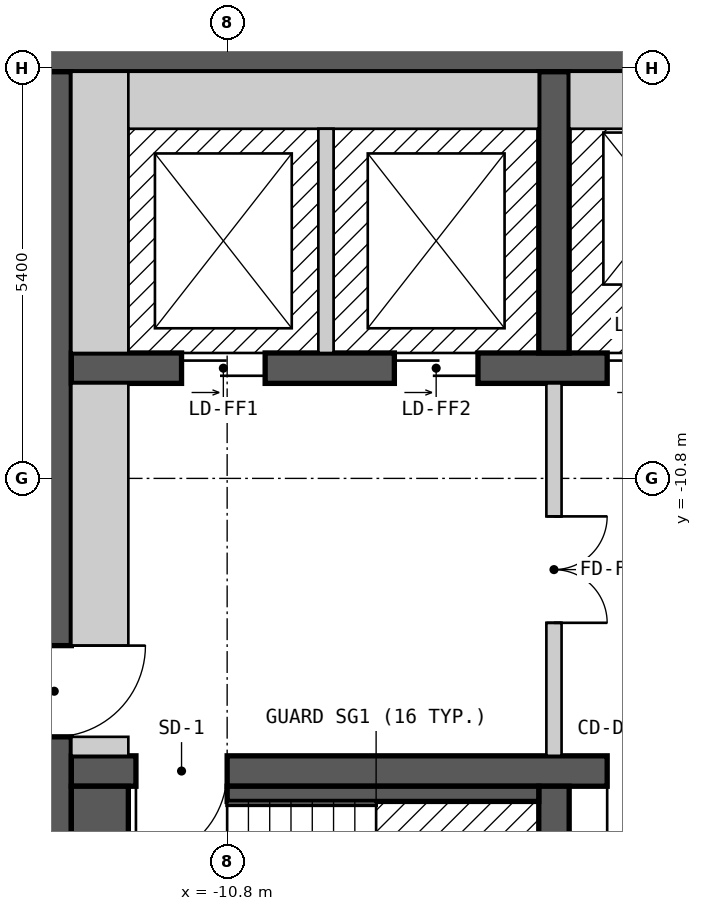
"""IFC4 building model, lengths in metres.
Left out: names, types, materials, properties, quantities, classifications, styles, units other than length and angle.
Written with IfcOpenShell. Run it as: python <this file> out.ifc"""

import sys

from ifc_helpers import new_model, si_unit, direction, frame, frame_2d, origin, place, context, subcontext, project, spatial, rectangle, extrude, element, fill, save


model = new_model("IFC4")
c1 = context("Model", 3, precision=1e-05, world=origin(), true_north=direction((0.0, 1.0)))
c2 = subcontext(c1, "Body", "Model", "MODEL_VIEW")
j1 = project(units=[si_unit("LENGTHUNIT", "METRE"), si_unit("PLANEANGLEUNIT", "RADIAN")], contexts=[c1])
p1 = place(None, origin())
s1 = spatial("IfcSite", under=j1, at=p1, CompositionType="ELEMENT")
p2 = place(p1, origin())
s2 = spatial("IfcBuilding", under=s1, at=p2, CompositionType="ELEMENT")
p3 = place(p2, frame((0.0, 0.0, 226.8)))
s3 = spatial("IfcBuildingStorey", under=s2, at=p3, CompositionType="ELEMENT", Elevation=226.8)
p4 = place(p3, frame((-13.3, -5.225, 0.0), z_axis=(0.0, 0.0, 1.0), x_axis=(1.0, 0.0, 0.0)))
e1 = element("IfcWall", 1, at=p4, inside=s3, PredefinedType="SHEAR", context=c2, shape_type="SweptSolid", body=[
    extrude(rectangle(XDim=26.6, YDim=0.45, at=frame_2d((13.3, 0.0))), origin(), (0.0, 0.0, 1.0), 2.7),
])
p5 = place(p4, frame((23.65, 0.0, 0.0)))
e2 = element("IfcOpeningElement", 2, at=p5, cuts=e1, PredefinedType="OPENING", context=c2, shape_type="SweptSolid", body=[
    extrude(rectangle(XDim=1.2, YDim=2.1, at=frame_2d((0.6, 1.05))), frame((0.0, 0.235, 0.0), z_axis=(0.0, -1.0, 0.0), x_axis=(1.0, 0.0, 0.0)), (0.0, 0.0, 1.0), 0.47),
])
p6 = place(p3, frame((-13.075, -18.55, 0.0), z_axis=(0.0, 0.0, 1.0), x_axis=(0.0, 1.0, 0.0)))
e3 = element("IfcWall", 3, at=p6, inside=s3, PredefinedType="SHEAR", context=c2, shape_type="SweptSolid", body=[
    extrude(rectangle(XDim=13.1, YDim=0.45, at=frame_2d((6.55, 0.0))), origin(), (0.0, 0.0, 1.0), 2.7),
])
p7 = place(p6, frame((4.35, 0.0, 0.0)))
e4 = element("IfcOpeningElement", 4, at=p7, cuts=e3, PredefinedType="OPENING", context=c2, shape_type="SweptSolid", body=[
    extrude(rectangle(XDim=1.2, YDim=2.1, at=frame_2d((0.6, 1.05))), frame((0.0, 0.235, 0.0), z_axis=(0.0, -1.0, 0.0), x_axis=(1.0, 0.0, 0.0)), (0.0, 0.0, 1.0), 0.47),
])
p8 = place(p3, frame((-12.85, -14.65, 0.0), z_axis=(0.0, 0.0, 1.0), x_axis=(1.0, 0.0, 0.0)))
e5 = element("IfcWall", 5, at=p8, inside=s3, PredefinedType="SHEAR", context=c2, shape_type="SweptSolid", body=[
    extrude(rectangle(XDim=25.7, YDim=0.4, at=frame_2d((12.85, 0.0))), origin(), (0.0, 0.0, 1.0), 2.7),
])
p9 = place(p8, frame((2.05, 0.0, 0.0), z_axis=(0.0, 0.0, 1.0), x_axis=(-1.0, 0.0, 0.0)))
e6 = element("IfcOpeningElement", 6, at=p9, cuts=e5, PredefinedType="OPENING", context=c2, shape_type="SweptSolid", body=[
    extrude(rectangle(XDim=1.2, YDim=2.1, at=frame_2d((0.6, 1.05))), frame((0.0, 0.21, 0.0), z_axis=(0.0, -1.0, 0.0), x_axis=(1.0, 0.0, 0.0)), (0.0, 0.0, 1.0), 0.42),
])
p10 = place(p8, frame((24.9, 0.0, 0.0), z_axis=(0.0, 0.0, 1.0), x_axis=(-1.0, 0.0, 0.0)))
e7 = element("IfcOpeningElement", 7, at=p10, cuts=e5, PredefinedType="OPENING", context=c2, shape_type="SweptSolid", body=[
    extrude(rectangle(XDim=1.2, YDim=2.1, at=frame_2d((0.6, 1.05))), frame((0.0, 0.21, 0.0), z_axis=(0.0, -1.0, 0.0), x_axis=(1.0, 0.0, 0.0)), (0.0, 0.0, 1.0), 0.42),
])
p11 = place(p8, frame((7.95, 0.0, 0.0), z_axis=(0.0, 0.0, 1.0), x_axis=(-1.0, 0.0, 0.0)))
e8 = element("IfcOpeningElement", 8, at=p11, cuts=e5, PredefinedType="OPENING", context=c2, shape_type="SweptSolid", body=[
    extrude(rectangle(XDim=0.9, YDim=2.1, at=frame_2d((0.45, 1.05))), frame((0.0, 0.21, 0.0), z_axis=(0.0, -1.0, 0.0), x_axis=(1.0, 0.0, 0.0)), (0.0, 0.0, 1.0), 0.42),
])
p12 = place(p8, frame((10.0, 0.0, 0.0), z_axis=(0.0, 0.0, 1.0), x_axis=(-1.0, 0.0, 0.0)))
e9 = element("IfcOpeningElement", 9, at=p12, cuts=e5, PredefinedType="OPENING", context=c2, shape_type="SweptSolid", body=[
    extrude(rectangle(XDim=0.9, YDim=2.1, at=frame_2d((0.45, 1.05))), frame((0.0, 0.21, 0.0), z_axis=(0.0, -1.0, 0.0), x_axis=(1.0, 0.0, 0.0)), (0.0, 0.0, 1.0), 0.42),
])
p13 = place(p8, frame((12.3, 0.0, 0.0), z_axis=(0.0, 0.0, 1.0), x_axis=(-1.0, 0.0, 0.0)))
e10 = element("IfcOpeningElement", 10, at=p13, cuts=e5, PredefinedType="OPENING", context=c2, shape_type="SweptSolid", body=[
    extrude(rectangle(XDim=1.0, YDim=2.1, at=frame_2d((0.5, 1.05))), frame((0.0, 0.21, 0.0), z_axis=(0.0, -1.0, 0.0), x_axis=(1.0, 0.0, 0.0)), (0.0, 0.0, 1.0), 0.42),
])
p14 = place(p8, frame((14.5, 0.0, 0.0), z_axis=(0.0, 0.0, 1.0), x_axis=(-1.0, 0.0, 0.0)))
e11 = element("IfcOpeningElement", 11, at=p14, cuts=e5, PredefinedType="OPENING", context=c2, shape_type="SweptSolid", body=[
    extrude(rectangle(XDim=0.9, YDim=2.1, at=frame_2d((0.45, 1.05))), frame((0.0, 0.21, 0.0), z_axis=(0.0, -1.0, 0.0), x_axis=(1.0, 0.0, 0.0)), (0.0, 0.0, 1.0), 0.42),
])
p15 = place(p8, frame((16.5, 0.0, 0.0), z_axis=(0.0, 0.0, 1.0), x_axis=(-1.0, 0.0, 0.0)))
e12 = element("IfcOpeningElement", 12, at=p15, cuts=e5, PredefinedType="OPENING", context=c2, shape_type="SweptSolid", body=[
    extrude(rectangle(XDim=0.9, YDim=2.1, at=frame_2d((0.45, 1.05))), frame((0.0, 0.21, 0.0), z_axis=(0.0, -1.0, 0.0), x_axis=(1.0, 0.0, 0.0)), (0.0, 0.0, 1.0), 0.42),
])
p16 = place(p8, frame((18.65, 0.0, 0.0), z_axis=(0.0, 0.0, 1.0), x_axis=(-1.0, 0.0, 0.0)))
e13 = element("IfcOpeningElement", 13, at=p16, cuts=e5, PredefinedType="OPENING", context=c2, shape_type="SweptSolid", body=[
    extrude(rectangle(XDim=1.0, YDim=2.1, at=frame_2d((0.5, 1.05))), frame((0.0, 0.21, 0.0), z_axis=(0.0, -1.0, 0.0), x_axis=(1.0, 0.0, 0.0)), (0.0, 0.0, 1.0), 0.42),
])
p17 = place(p3, frame((-12.85, -9.35, 0.0), z_axis=(0.0, 0.0, 1.0), x_axis=(1.0, 0.0, 0.0)))
e14 = element("IfcWall", 14, at=p17, inside=s3, PredefinedType="SHEAR", context=c2, shape_type="SweptSolid", body=[
    extrude(rectangle(XDim=23.05, YDim=0.4, at=frame_2d((11.525, 0.0))), origin(), (0.0, 0.0, 1.0), 2.7),
])
p18 = place(p17, frame((1.45, 0.0, 0.0)))
e15 = element("IfcOpeningElement", 15, at=p18, cuts=e14, PredefinedType="OPENING", context=c2, shape_type="SweptSolid", body=[
    extrude(rectangle(XDim=1.1, YDim=2.1, at=frame_2d((0.55, 1.05))), frame((0.0, 0.21, 0.0), z_axis=(0.0, -1.0, 0.0), x_axis=(1.0, 0.0, 0.0)), (0.0, 0.0, 1.0), 0.42),
])
p19 = place(p17, frame((4.25, 0.0, 0.0)))
e16 = element("IfcOpeningElement", 16, at=p19, cuts=e14, PredefinedType="OPENING", context=c2, shape_type="SweptSolid", body=[
    extrude(rectangle(XDim=1.1, YDim=2.1, at=frame_2d((0.55, 1.05))), frame((0.0, 0.21, 0.0), z_axis=(0.0, -1.0, 0.0), x_axis=(1.0, 0.0, 0.0)), (0.0, 0.0, 1.0), 0.42),
])
p20 = place(p17, frame((7.05, 0.0, 0.0)))
e17 = element("IfcOpeningElement", 17, at=p20, cuts=e14, PredefinedType="OPENING", context=c2, shape_type="SweptSolid", body=[
    extrude(rectangle(XDim=1.1, YDim=2.1, at=frame_2d((0.55, 1.05))), frame((0.0, 0.21, 0.0), z_axis=(0.0, -1.0, 0.0), x_axis=(1.0, 0.0, 0.0)), (0.0, 0.0, 1.0), 0.42),
])
p21 = place(p17, frame((9.35, 0.0, 0.0)))
e18 = element("IfcOpeningElement", 18, at=p21, cuts=e14, PredefinedType="OPENING", context=c2, shape_type="SweptSolid", body=[
    extrude(rectangle(XDim=1.1, YDim=2.1, at=frame_2d((0.55, 1.05))), frame((0.0, 0.21, 0.0), z_axis=(0.0, -1.0, 0.0), x_axis=(1.0, 0.0, 0.0)), (0.0, 0.0, 1.0), 0.42),
])
p22 = place(p17, frame((11.65, 0.0, 0.0)))
e19 = element("IfcOpeningElement", 19, at=p22, cuts=e14, PredefinedType="OPENING", context=c2, shape_type="SweptSolid", body=[
    extrude(rectangle(XDim=1.1, YDim=2.1, at=frame_2d((0.55, 1.05))), frame((0.0, 0.21, 0.0), z_axis=(0.0, -1.0, 0.0), x_axis=(1.0, 0.0, 0.0)), (0.0, 0.0, 1.0), 0.42),
])
p23 = place(p17, frame((13.95, 0.0, 0.0)))
e20 = element("IfcOpeningElement", 20, at=p23, cuts=e14, PredefinedType="OPENING", context=c2, shape_type="SweptSolid", body=[
    extrude(rectangle(XDim=1.1, YDim=2.1, at=frame_2d((0.55, 1.05))), frame((0.0, 0.21, 0.0), z_axis=(0.0, -1.0, 0.0), x_axis=(1.0, 0.0, 0.0)), (0.0, 0.0, 1.0), 0.42),
])
p24 = place(p17, frame((16.25, 0.0, 0.0)))
e21 = element("IfcOpeningElement", 21, at=p24, cuts=e14, PredefinedType="OPENING", context=c2, shape_type="SweptSolid", body=[
    extrude(rectangle(XDim=1.1, YDim=2.1, at=frame_2d((0.55, 1.05))), frame((0.0, 0.21, 0.0), z_axis=(0.0, -1.0, 0.0), x_axis=(1.0, 0.0, 0.0)), (0.0, 0.0, 1.0), 0.42),
])
p25 = place(p17, frame((18.55, 0.0, 0.0)))
e22 = element("IfcOpeningElement", 22, at=p25, cuts=e14, PredefinedType="OPENING", context=c2, shape_type="SweptSolid", body=[
    extrude(rectangle(XDim=1.1, YDim=2.1, at=frame_2d((0.55, 1.05))), frame((0.0, 0.21, 0.0), z_axis=(0.0, -1.0, 0.0), x_axis=(1.0, 0.0, 0.0)), (0.0, 0.0, 1.0), 0.42),
])
p26 = place(p17, frame((20.95, 0.0, 0.0)))
e23 = element("IfcOpeningElement", 23, at=p26, cuts=e14, PredefinedType="OPENING", context=c2, shape_type="SweptSolid", body=[
    extrude(rectangle(XDim=1.1, YDim=2.1, at=frame_2d((0.55, 1.05))), frame((0.0, 0.21, 0.0), z_axis=(0.0, -1.0, 0.0), x_axis=(1.0, 0.0, 0.0)), (0.0, 0.0, 1.0), 0.42),
])
for number, where, z_axis, x_axis in (
    (24, (-6.5, -18.55, 0.0), (0.0, 0.0, 1.0), (0.0, 1.0, 0.0)),
    (25, (-6.5, -9.15, 0.0), (0.0, 0.0, 1.0), (0.0, 1.0, 0.0)),
):
    element("IfcWall", number, at=place(p3, frame(where, z_axis=z_axis, x_axis=x_axis)), inside=s3, PredefinedType="SHEAR", context=c2, shape_type="SweptSolid", body=[
        extrude(rectangle(XDim=3.7, YDim=0.4, at=frame_2d((1.85, 0.0))), origin(), (0.0, 0.0, 1.0), 2.7),
    ])
p27 = place(p3, frame((-12.475, -18.55, 0.0), z_axis=(0.0, 0.0, 1.0), x_axis=(0.0, 1.0, 0.0)))
e26 = element("IfcWall", 26, at=p27, inside=s3, PredefinedType="SOLIDWALL", context=c2, shape_type="SweptSolid", body=[
    extrude(rectangle(XDim=3.7, YDim=0.75, at=frame_2d((1.85, 0.0))), origin(), (0.0, 0.0, 1.0), 2.7),
])
p28 = place(p3, frame((-12.85, -14.325, 0.0), z_axis=(0.0, 0.0, 1.0), x_axis=(1.0, 0.0, 0.0)))
e27 = element("IfcWall", 27, at=p28, inside=s3, PredefinedType="PARTITIONING", context=c2, shape_type="SweptSolid", body=[
    extrude(rectangle(XDim=0.75, YDim=0.25, at=frame_2d((0.375, 0.0))), origin(), (0.0, 0.0, 1.0), 2.7),
])
p29 = place(p3, frame((-12.475, -13.0, 0.0), z_axis=(0.0, 0.0, 1.0), x_axis=(0.0, 1.0, 0.0)))
e28 = element("IfcWall", 28, at=p29, inside=s3, PredefinedType="PARTITIONING", context=c2, shape_type="SweptSolid", body=[
    extrude(rectangle(XDim=3.45, YDim=0.75, at=frame_2d((1.725, 0.0))), origin(), (0.0, 0.0, 1.0), 2.7),
])
p30 = place(p3, frame((-12.475, -9.15, 0.0), z_axis=(0.0, 0.0, 1.0), x_axis=(0.0, 1.0, 0.0)))
e29 = element("IfcWall", 29, at=p30, inside=s3, PredefinedType="SOLIDWALL", context=c2, shape_type="SweptSolid", body=[
    extrude(rectangle(XDim=3.7, YDim=0.75, at=frame_2d((1.85, 0.0))), origin(), (0.0, 0.0, 1.0), 2.7),
])
p31 = place(p3, frame((-12.1, -5.825, 0.0), z_axis=(0.0, 0.0, 1.0), x_axis=(1.0, 0.0, 0.0)))
e30 = element("IfcWall", 30, at=p31, inside=s3, PredefinedType="SOLIDWALL", context=c2, shape_type="SweptSolid", body=[
    extrude(rectangle(XDim=5.4, YDim=0.75, at=frame_2d((2.7, 0.0))), origin(), (0.0, 0.0, 1.0), 2.7),
])
p32 = place(p3, frame((-10.8, -14.95, 0.0), z_axis=(0.0, 0.0, 1.0), x_axis=(1.0, 0.0, 0.0)))
e31 = element("IfcWall", 31, at=p32, inside=s3, PredefinedType="SOLIDWALL", context=c2, shape_type="SweptSolid", body=[
    extrude(rectangle(XDim=4.1, YDim=0.2, at=frame_2d((2.05, 0.0))), origin(), (0.0, 0.0, 1.0), 2.7),
])
p33 = place(p3, frame((-9.5, -9.15, 0.0), z_axis=(0.0, 0.0, 1.0), x_axis=(0.0, 1.0, 0.0)))
e32 = element("IfcWall", 32, at=p33, inside=s3, PredefinedType="SOLIDWALL", context=c2, shape_type="SweptSolid", body=[
    extrude(rectangle(XDim=2.95, YDim=0.2, at=frame_2d((1.475, 0.0))), origin(), (0.0, 0.0, 1.0), 2.7),
])
p34 = place(p3, frame((-6.5, -14.45, 0.0), z_axis=(0.0, 0.0, 1.0), x_axis=(0.0, 1.0, 0.0)))
e33 = element("IfcWall", 33, at=p34, inside=s3, PredefinedType="PARTITIONING", context=c2, shape_type="SweptSolid", body=[
    extrude(rectangle(XDim=4.9, YDim=0.2, at=frame_2d((2.45, 0.0))), origin(), (0.0, 0.0, 1.0), 2.7),
])
p35 = place(p34, frame((3.15, 0.0, 0.0), z_axis=(0.0, 0.0, 1.0), x_axis=(-1.0, 0.0, 0.0)))
e34 = element("IfcOpeningElement", 34, at=p35, cuts=e33, PredefinedType="OPENING", context=c2, shape_type="SweptSolid", body=[
    extrude(rectangle(XDim=1.4, YDim=2.1, at=frame_2d((0.7, 1.05))), frame((0.0, 0.11, 0.0), z_axis=(0.0, -1.0, 0.0), x_axis=(1.0, 0.0, 0.0)), (0.0, 0.0, 1.0), 0.22),
])
p36 = place(p3, frame((-6.3, -5.825, 0.0), z_axis=(0.0, 0.0, 1.0), x_axis=(1.0, 0.0, 0.0)))
e35 = element("IfcWall", 35, at=p36, inside=s3, PredefinedType="SOLIDWALL", context=c2, shape_type="SweptSolid", body=[
    extrude(rectangle(XDim=16.1, YDim=0.75, at=frame_2d((8.05, 0.0))), origin(), (0.0, 0.0, 1.0), 2.7),
])
p37 = place(p18, origin())
e36 = element("IfcDoor", 36, at=p37, inside=s3, OperationType="DOUBLE_DOOR_SLIDING", PredefinedType="DOOR", context=c2, shape_type="SweptSolid", body=[
    extrude(rectangle(XDim=1.1, YDim=2.1, at=frame_2d((0.55, 1.05))), frame((0.0, 0.025, 0.0), z_axis=(0.0, -1.0, 0.0), x_axis=(1.0, 0.0, 0.0)), (0.0, 0.0, 1.0), 0.05),
])
fill(e15, e36)
p38 = place(p19, origin())
e37 = element("IfcDoor", 37, at=p38, inside=s3, OperationType="DOUBLE_DOOR_SLIDING", PredefinedType="DOOR", context=c2, shape_type="SweptSolid", body=[
    extrude(rectangle(XDim=1.1, YDim=2.1, at=frame_2d((0.55, 1.05))), frame((0.0, 0.025, 0.0), z_axis=(0.0, -1.0, 0.0), x_axis=(1.0, 0.0, 0.0)), (0.0, 0.0, 1.0), 0.05),
])
fill(e16, e37)
p39 = place(p20, origin())
e38 = element("IfcDoor", 38, at=p39, inside=s3, OperationType="DOUBLE_DOOR_SLIDING", PredefinedType="DOOR", context=c2, shape_type="SweptSolid", body=[
    extrude(rectangle(XDim=1.1, YDim=2.1, at=frame_2d((0.55, 1.05))), frame((0.0, 0.025, 0.0), z_axis=(0.0, -1.0, 0.0), x_axis=(1.0, 0.0, 0.0)), (0.0, 0.0, 1.0), 0.05),
])
fill(e17, e38)
p40 = place(p9, origin())
e39 = element("IfcDoor", 39, at=p40, inside=s3, OperationType="SINGLE_SWING_RIGHT", PredefinedType="DOOR", context=c2, shape_type="SweptSolid", body=[
    extrude(rectangle(XDim=1.2, YDim=2.1, at=frame_2d((0.6, 1.05))), frame((0.0, 0.025, 0.0), z_axis=(0.0, -1.0, 0.0), x_axis=(1.0, 0.0, 0.0)), (0.0, 0.0, 1.0), 0.05),
])
fill(e6, e39)
p41 = place(p7, origin())
e40 = element("IfcDoor", 40, at=p41, inside=s3, OperationType="SINGLE_SWING_RIGHT", PredefinedType="DOOR", context=c2, shape_type="SweptSolid", body=[
    extrude(rectangle(XDim=1.2, YDim=2.1, at=frame_2d((0.6, 1.05))), frame((0.0, 0.025, 0.0), z_axis=(0.0, -1.0, 0.0), x_axis=(1.0, 0.0, 0.0)), (0.0, 0.0, 1.0), 0.05),
])
fill(e4, e40)
p42 = place(p35, origin())
e41 = element("IfcDoor", 41, at=p42, inside=s3, OperationType="DOUBLE_DOOR_SINGLE_SWING", PredefinedType="DOOR", context=c2, shape_type="SweptSolid", body=[
    extrude(rectangle(XDim=1.4, YDim=2.1, at=frame_2d((0.7, 1.05))), frame((0.0, 0.025, 0.0), z_axis=(0.0, -1.0, 0.0), x_axis=(1.0, 0.0, 0.0)), (0.0, 0.0, 1.0), 0.05),
])
fill(e34, e41)
p43 = place(p11, origin())
e42 = element("IfcDoor", 42, at=p43, inside=s3, OperationType="SINGLE_SWING_RIGHT", PredefinedType="DOOR", context=c2, shape_type="SweptSolid", body=[
    extrude(rectangle(XDim=0.9, YDim=2.1, at=frame_2d((0.45, 1.05))), frame((0.0, 0.025, 0.0), z_axis=(0.0, -1.0, 0.0), x_axis=(1.0, 0.0, 0.0)), (0.0, 0.0, 1.0), 0.05),
])
fill(e8, e42)
save(model, sys.argv[1])
